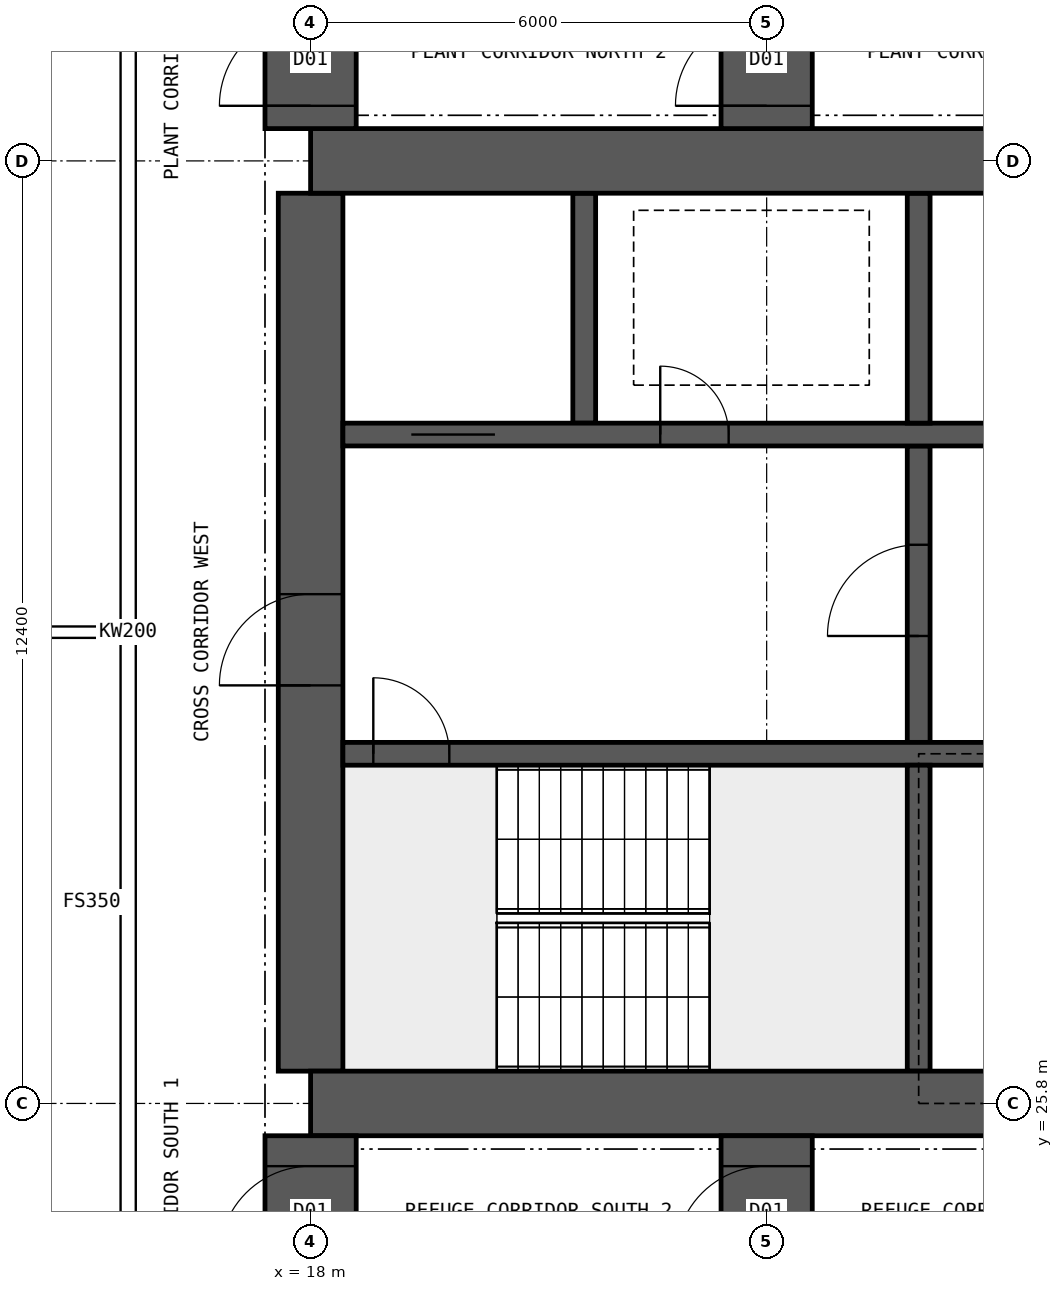
"""IFC4 building model, lengths in metres.
Left out: names, types, materials, properties, quantities, classifications, styles, units other than length and angle.
Written with IfcOpenShell. Run it as: python <this file> out.ifc"""

import sys

from ifc_helpers import new_model, si_unit, direction, frame, frame_2d, origin, place, context, subcontext, project, spatial, polyline, rectangle, outline, extrude, element, fill, save


model = new_model("IFC4")
c1 = context("Model", 3, precision=1e-05, world=origin(), true_north=direction((0.0, 1.0)))
c2 = subcontext(c1, "Body", "Model", "MODEL_VIEW")
j1 = project(units=[si_unit("LENGTHUNIT", "METRE"), si_unit("PLANEANGLEUNIT", "RADIAN")], contexts=[c1])
p1 = place(None, origin())
s1 = spatial("IfcSite", under=j1, at=p1, CompositionType="ELEMENT")
p2 = place(p1, origin())
s2 = spatial("IfcBuilding", under=s1, at=p2, CompositionType="ELEMENT")
p3 = place(p2, frame((0.0, 0.0, 201.1)))
s3 = spatial("IfcBuildingStorey", under=s2, at=p3, CompositionType="ELEMENT", Elevation=201.1)
for number, where, z_axis, x_axis in (
    (1, (18.0, 25.8, 0.0), (0.0, 0.0, 1.0), (1.0, 0.0, 0.0)),
    (2, (18.0, 38.2, 0.0), (0.0, 0.0, 1.0), (1.0, 0.0, 0.0)),
):
    element("IfcWall", number, at=place(p3, frame(where, z_axis=z_axis, x_axis=x_axis)), inside=s3, PredefinedType="SHEAR", context=c2, shape_type="SweptSolid", body=[
        extrude(rectangle(XDim=48.0, YDim=0.85, at=frame_2d((24.0, 0.0))), origin(), (0.0, 0.0, 1.0), 7.2),
    ])
p4 = place(p3, frame((18.0, 26.225, 0.0), z_axis=(0.0, 0.0, 1.0), x_axis=(0.0, 1.0, 0.0)))
e3 = element("IfcWall", 3, at=p4, inside=s3, PredefinedType="SHEAR", context=c2, shape_type="SweptSolid", body=[
    extrude(rectangle(XDim=11.55, YDim=0.85, at=frame_2d((5.775, 0.0))), origin(), (0.0, 0.0, 1.0), 7.2),
])
p5 = place(p4, frame((5.075, 0.0, 0.0)))
e4 = element("IfcOpeningElement", 4, at=p5, cuts=e3, PredefinedType="OPENING", context=c2, shape_type="SweptSolid", body=[
    extrude(rectangle(XDim=1.2, YDim=2.1, at=frame_2d((0.6, 1.05))), frame((0.0, 0.435, 0.0), z_axis=(0.0, -1.0, 0.0), x_axis=(1.0, 0.0, 0.0)), (0.0, 0.0, 1.0), 0.87),
])
p6 = place(p3, frame((18.425, 30.4, 0.0), z_axis=(0.0, 0.0, 1.0), x_axis=(1.0, 0.0, 0.0)))
e5 = element("IfcWall", 5, at=p6, inside=s3, PredefinedType="SHEAR", context=c2, shape_type="SweptSolid", body=[
    extrude(rectangle(XDim=47.15, YDim=0.3, at=frame_2d((23.575, 0.0))), origin(), (0.0, 0.0, 1.0), 7.2),
])
p7 = place(p6, frame((0.4, 0.0, 0.0)))
e6 = element("IfcOpeningElement", 6, at=p7, cuts=e5, PredefinedType="OPENING", context=c2, shape_type="SweptSolid", body=[
    extrude(rectangle(XDim=1.0, YDim=2.1, at=frame_2d((0.5, 1.05))), frame((0.0, 0.16, 0.0), z_axis=(0.0, -1.0, 0.0), x_axis=(1.0, 0.0, 0.0)), (0.0, 0.0, 1.0), 0.32),
])
p8 = place(p6, frame((45.75, 0.0, 0.0)))
e7 = element("IfcOpeningElement", 7, at=p8, cuts=e5, PredefinedType="OPENING", context=c2, shape_type="SweptSolid", body=[
    extrude(rectangle(XDim=1.0, YDim=2.1, at=frame_2d((0.5, 1.05))), frame((0.0, 0.16, 0.0), z_axis=(0.0, -1.0, 0.0), x_axis=(1.0, 0.0, 0.0)), (0.0, 0.0, 1.0), 0.32),
])
p9 = place(p6, frame((18.9, 0.0, 0.0)))
e8 = element("IfcOpeningElement", 8, at=p9, cuts=e5, PredefinedType="OPENING", context=c2, shape_type="SweptSolid", body=[
    extrude(rectangle(XDim=0.9, YDim=2.1, at=frame_2d((0.45, 1.05))), frame((0.0, 0.16, 0.0), z_axis=(0.0, -1.0, 0.0), x_axis=(1.0, 0.0, 0.0)), (0.0, 0.0, 1.0), 0.32),
])
p10 = place(p6, frame((30.192, 0.0, 0.0)))
e9 = element("IfcOpeningElement", 9, at=p10, cuts=e5, PredefinedType="OPENING", context=c2, shape_type="SweptSolid", body=[
    extrude(rectangle(XDim=1.1, YDim=2.1, at=frame_2d((0.55, 1.05))), frame((0.0, 0.16, 0.0), z_axis=(0.0, -1.0, 0.0), x_axis=(1.0, 0.0, 0.0)), (0.0, 0.0, 1.0), 0.32),
])
p11 = place(p6, frame((33.725, 0.0, 0.0)))
e10 = element("IfcOpeningElement", 10, at=p11, cuts=e5, PredefinedType="OPENING", context=c2, shape_type="SweptSolid", body=[
    extrude(rectangle(XDim=1.1, YDim=2.1, at=frame_2d((0.55, 1.05))), frame((0.0, 0.16, 0.0), z_axis=(0.0, -1.0, 0.0), x_axis=(1.0, 0.0, 0.0)), (0.0, 0.0, 1.0), 0.32),
])
p12 = place(p6, frame((37.258, 0.0, 0.0)))
e11 = element("IfcOpeningElement", 11, at=p12, cuts=e5, PredefinedType="OPENING", context=c2, shape_type="SweptSolid", body=[
    extrude(rectangle(XDim=1.1, YDim=2.1, at=frame_2d((0.55, 1.05))), frame((0.0, 0.16, 0.0), z_axis=(0.0, -1.0, 0.0), x_axis=(1.0, 0.0, 0.0)), (0.0, 0.0, 1.0), 0.32),
])
p13 = place(p3, frame((18.425, 34.6, 0.0), z_axis=(0.0, 0.0, 1.0), x_axis=(1.0, 0.0, 0.0)))
e12 = element("IfcWall", 12, at=p13, inside=s3, PredefinedType="SHEAR", context=c2, shape_type="SweptSolid", body=[
    extrude(rectangle(XDim=47.15, YDim=0.3, at=frame_2d((23.575, 0.0))), origin(), (0.0, 0.0, 1.0), 7.2),
])
p14 = place(p13, frame((0.9, 0.0, 0.0)))
e13 = element("IfcOpeningElement", 13, at=p14, cuts=e12, PredefinedType="OPENING", context=c2, shape_type="SweptSolid", body=[
    extrude(rectangle(XDim=1.1, YDim=2.1, at=frame_2d((0.55, 1.05))), frame((0.0, 0.16, 0.0), z_axis=(0.0, -1.0, 0.0), x_axis=(1.0, 0.0, 0.0)), (0.0, 0.0, 1.0), 0.32),
])
p15 = place(p13, frame((45.15, 0.0, 0.0)))
e14 = element("IfcOpeningElement", 14, at=p15, cuts=e12, PredefinedType="OPENING", context=c2, shape_type="SweptSolid", body=[
    extrude(rectangle(XDim=1.1, YDim=2.1, at=frame_2d((0.55, 1.05))), frame((0.0, 0.16, 0.0), z_axis=(0.0, -1.0, 0.0), x_axis=(1.0, 0.0, 0.0)), (0.0, 0.0, 1.0), 0.32),
])
p16 = place(p13, frame((4.175, 0.0, 0.0)))
e15 = element("IfcOpeningElement", 15, at=p16, cuts=e12, PredefinedType="OPENING", context=c2, shape_type="SweptSolid", body=[
    extrude(rectangle(XDim=0.9, YDim=2.1, at=frame_2d((0.45, 1.05))), frame((0.0, 0.16, 0.0), z_axis=(0.0, -1.0, 0.0), x_axis=(1.0, 0.0, 0.0)), (0.0, 0.0, 1.0), 0.32),
])
p17 = place(p13, frame((42.075, 0.0, 0.0)))
e16 = element("IfcOpeningElement", 16, at=p17, cuts=e12, PredefinedType="OPENING", context=c2, shape_type="SweptSolid", body=[
    extrude(rectangle(XDim=0.9, YDim=2.1, at=frame_2d((0.45, 1.05))), frame((0.0, 0.16, 0.0), z_axis=(0.0, -1.0, 0.0), x_axis=(1.0, 0.0, 0.0)), (0.0, 0.0, 1.0), 0.32),
])
p18 = place(p13, frame((8.95, 0.0, 0.0)))
e17 = element("IfcOpeningElement", 17, at=p18, cuts=e12, PredefinedType="OPENING", context=c2, shape_type="SweptSolid", body=[
    extrude(rectangle(XDim=0.9, YDim=2.1, at=frame_2d((0.45, 1.05))), frame((0.0, 0.16, 0.0), z_axis=(0.0, -1.0, 0.0), x_axis=(1.0, 0.0, 0.0)), (0.0, 0.0, 1.0), 0.32),
])
p19 = place(p13, frame((12.924, 0.0, 0.0)))
e18 = element("IfcOpeningElement", 18, at=p19, cuts=e12, PredefinedType="OPENING", context=c2, shape_type="SweptSolid", body=[
    extrude(rectangle(XDim=0.9, YDim=2.1, at=frame_2d((0.45, 1.05))), frame((0.0, 0.16, 0.0), z_axis=(0.0, -1.0, 0.0), x_axis=(1.0, 0.0, 0.0)), (0.0, 0.0, 1.0), 0.32),
])
p20 = place(p13, frame((16.571, 0.0, 0.0)))
e19 = element("IfcOpeningElement", 19, at=p20, cuts=e12, PredefinedType="OPENING", context=c2, shape_type="SweptSolid", body=[
    extrude(rectangle(XDim=0.9, YDim=2.1, at=frame_2d((0.45, 1.05))), frame((0.0, 0.16, 0.0), z_axis=(0.0, -1.0, 0.0), x_axis=(1.0, 0.0, 0.0)), (0.0, 0.0, 1.0), 0.32),
])
p21 = place(p13, frame((20.33, 0.0, 0.0)))
e20 = element("IfcOpeningElement", 20, at=p21, cuts=e12, PredefinedType="OPENING", context=c2, shape_type="SweptSolid", body=[
    extrude(rectangle(XDim=0.9, YDim=2.1, at=frame_2d((0.45, 1.05))), frame((0.0, 0.16, 0.0), z_axis=(0.0, -1.0, 0.0), x_axis=(1.0, 0.0, 0.0)), (0.0, 0.0, 1.0), 0.32),
])
p22 = place(p13, frame((24.736, 0.0, 0.0)))
e21 = element("IfcOpeningElement", 21, at=p22, cuts=e12, PredefinedType="OPENING", context=c2, shape_type="SweptSolid", body=[
    extrude(rectangle(XDim=0.9, YDim=2.1, at=frame_2d((0.45, 1.05))), frame((0.0, 0.16, 0.0), z_axis=(0.0, -1.0, 0.0), x_axis=(1.0, 0.0, 0.0)), (0.0, 0.0, 1.0), 0.32),
])
p23 = place(p13, frame((27.533, 0.0, 0.0)))
e22 = element("IfcOpeningElement", 22, at=p23, cuts=e12, PredefinedType="OPENING", context=c2, shape_type="SweptSolid", body=[
    extrude(rectangle(XDim=0.9, YDim=2.1, at=frame_2d((0.45, 1.05))), frame((0.0, 0.16, 0.0), z_axis=(0.0, -1.0, 0.0), x_axis=(1.0, 0.0, 0.0)), (0.0, 0.0, 1.0), 0.32),
])
p24 = place(p13, frame((29.906, 0.0, 0.0)))
e23 = element("IfcOpeningElement", 23, at=p24, cuts=e12, PredefinedType="OPENING", context=c2, shape_type="SweptSolid", body=[
    extrude(rectangle(XDim=0.9, YDim=2.1, at=frame_2d((0.45, 1.05))), frame((0.0, 0.16, 0.0), z_axis=(0.0, -1.0, 0.0), x_axis=(1.0, 0.0, 0.0)), (0.0, 0.0, 1.0), 0.32),
])
p25 = place(p13, frame((35.376, 0.0, 0.0)))
e24 = element("IfcOpeningElement", 24, at=p25, cuts=e12, PredefinedType="OPENING", context=c2, shape_type="SweptSolid", body=[
    extrude(rectangle(XDim=0.9, YDim=2.1, at=frame_2d((0.45, 1.05))), frame((0.0, 0.16, 0.0), z_axis=(0.0, -1.0, 0.0), x_axis=(1.0, 0.0, 0.0)), (0.0, 0.0, 1.0), 0.32),
])
p26 = place(p3, frame((26.0, 26.225, 0.0), z_axis=(0.0, 0.0, 1.0), x_axis=(0.0, 1.0, 0.0)))
e25 = element("IfcWall", 25, at=p26, inside=s3, PredefinedType="SHEAR", context=c2, shape_type="SweptSolid", body=[
    extrude(rectangle(XDim=4.025, YDim=0.3, at=frame_2d((2.012, 0.0))), origin(), (0.0, 0.0, 1.0), 7.2),
])
p27 = place(p3, frame((26.0, 30.55, 0.0), z_axis=(0.0, 0.0, 1.0), x_axis=(0.0, 1.0, 0.0)))
e26 = element("IfcWall", 26, at=p27, inside=s3, PredefinedType="SHEAR", context=c2, shape_type="SweptSolid", body=[
    extrude(rectangle(XDim=3.9, YDim=0.3, at=frame_2d((1.95, 0.0))), origin(), (0.0, 0.0, 1.0), 7.2),
])
p28 = place(p27, frame((1.4, 0.0, 0.0)))
e27 = element("IfcOpeningElement", 27, at=p28, cuts=e26, PredefinedType="OPENING", context=c2, shape_type="SweptSolid", body=[
    extrude(rectangle(XDim=1.2, YDim=2.1, at=frame_2d((0.6, 1.05))), frame((0.0, 0.16, 0.0), z_axis=(0.0, -1.0, 0.0), x_axis=(1.0, 0.0, 0.0)), (0.0, 0.0, 1.0), 0.32),
])
for number, where, z_axis, x_axis in (
    (28, (21.6, 34.75, 0.0), (0.0, 0.0, 1.0), (0.0, 1.0, 0.0)),
    (29, (26.0, 34.75, 0.0), (0.0, 0.0, 1.0), (0.0, 1.0, 0.0)),
):
    element("IfcWall", number, at=place(p3, frame(where, z_axis=z_axis, x_axis=x_axis)), inside=s3, PredefinedType="SHEAR", context=c2, shape_type="SweptSolid", body=[
        extrude(rectangle(XDim=3.025, YDim=0.3, at=frame_2d((1.512, 0.0))), origin(), (0.0, 0.0, 1.0), 7.2),
    ])
p29 = place(p3, frame((18.0, 10.0, 0.0), z_axis=(0.0, 0.0, 1.0), x_axis=(0.0, 1.0, 0.0)))
e30 = element("IfcWall", 30, at=p29, inside=s3, PredefinedType="SHEAR", context=c2, shape_type="SweptSolid", body=[
    extrude(rectangle(XDim=15.375, YDim=1.2, at=frame_2d((7.688, 0.0))), origin(), (0.0, 0.0, 1.0), 7.2),
])
p30 = place(p29, frame((13.775, 0.0, 0.0)))
e31 = element("IfcOpeningElement", 31, at=p30, cuts=e30, PredefinedType="OPENING", context=c2, shape_type="SweptSolid", body=[
    extrude(rectangle(XDim=1.2, YDim=2.1, at=frame_2d((0.6, 1.05))), frame((0.0, 0.61, 0.0), z_axis=(0.0, -1.0, 0.0), x_axis=(1.0, 0.0, 0.0)), (0.0, 0.0, 1.0), 1.22),
])
p31 = place(p29, frame((3.95, 0.0, 0.0)))
e32 = element("IfcOpeningElement", 32, at=p31, cuts=e30, PredefinedType="OPENING", context=c2, shape_type="SweptSolid", body=[
    extrude(rectangle(XDim=1.2, YDim=2.1, at=frame_2d((0.6, 1.05))), frame((0.0, 0.61, 0.0), z_axis=(0.0, -1.0, 0.0), x_axis=(1.0, 0.0, 0.0)), (0.0, 0.0, 1.0), 1.22),
])
p32 = place(p3, frame((18.0, 38.625, 0.0), z_axis=(0.0, 0.0, 1.0), x_axis=(0.0, 1.0, 0.0)))
e33 = element("IfcWall", 33, at=p32, inside=s3, PredefinedType="SHEAR", context=c2, shape_type="SweptSolid", body=[
    extrude(rectangle(XDim=15.375, YDim=1.2, at=frame_2d((7.688, 0.0))), origin(), (0.0, 0.0, 1.0), 7.2),
])
p33 = place(p32, frame((0.3, 0.0, 0.0)))
e34 = element("IfcOpeningElement", 34, at=p33, cuts=e33, PredefinedType="OPENING", context=c2, shape_type="SweptSolid", body=[
    extrude(rectangle(XDim=1.2, YDim=2.1, at=frame_2d((0.6, 1.05))), frame((0.0, 0.61, 0.0), z_axis=(0.0, -1.0, 0.0), x_axis=(1.0, 0.0, 0.0)), (0.0, 0.0, 1.0), 1.22),
])
p34 = place(p32, frame((10.225, 0.0, 0.0)))
e35 = element("IfcOpeningElement", 35, at=p34, cuts=e33, PredefinedType="OPENING", context=c2, shape_type="SweptSolid", body=[
    extrude(rectangle(XDim=1.2, YDim=2.1, at=frame_2d((0.6, 1.05))), frame((0.0, 0.61, 0.0), z_axis=(0.0, -1.0, 0.0), x_axis=(1.0, 0.0, 0.0)), (0.0, 0.0, 1.0), 1.22),
])
p35 = place(p3, frame((24.0, 10.0, 0.0), z_axis=(0.0, 0.0, 1.0), x_axis=(0.0, 1.0, 0.0)))
e36 = element("IfcWall", 36, at=p35, inside=s3, PredefinedType="SHEAR", context=c2, shape_type="SweptSolid", body=[
    extrude(rectangle(XDim=15.375, YDim=1.2, at=frame_2d((7.688, 0.0))), origin(), (0.0, 0.0, 1.0), 7.2),
])
p36 = place(p35, frame((13.775, 0.0, 0.0)))
e37 = element("IfcOpeningElement", 37, at=p36, cuts=e36, PredefinedType="OPENING", context=c2, shape_type="SweptSolid", body=[
    extrude(rectangle(XDim=1.2, YDim=2.1, at=frame_2d((0.6, 1.05))), frame((0.0, 0.61, 0.0), z_axis=(0.0, -1.0, 0.0), x_axis=(1.0, 0.0, 0.0)), (0.0, 0.0, 1.0), 1.22),
])
p37 = place(p3, frame((24.0, 38.625, 0.0), z_axis=(0.0, 0.0, 1.0), x_axis=(0.0, 1.0, 0.0)))
e38 = element("IfcWall", 38, at=p37, inside=s3, PredefinedType="SHEAR", context=c2, shape_type="SweptSolid", body=[
    extrude(rectangle(XDim=15.375, YDim=1.2, at=frame_2d((7.688, 0.0))), origin(), (0.0, 0.0, 1.0), 7.2),
])
p38 = place(p37, frame((0.3, 0.0, 0.0)))
e39 = element("IfcOpeningElement", 39, at=p38, cuts=e38, PredefinedType="OPENING", context=c2, shape_type="SweptSolid", body=[
    extrude(rectangle(XDim=1.2, YDim=2.1, at=frame_2d((0.6, 1.05))), frame((0.0, 0.61, 0.0), z_axis=(0.0, -1.0, 0.0), x_axis=(1.0, 0.0, 0.0)), (0.0, 0.0, 1.0), 1.22),
])
p39 = place(p3, frame((15.6, 23.475, 0.0), z_axis=(0.0, 0.0, 1.0), x_axis=(0.0, 1.0, 0.0)))
e40 = element("IfcWall", 40, at=p39, inside=s3, PredefinedType="SOLIDWALL", context=c2, shape_type="SweptSolid", body=[
    extrude(rectangle(XDim=17.05, YDim=0.2, at=frame_2d((8.525, 0.0))), origin(), (0.0, 0.0, 1.0), 6.9),
])
p40 = place(p3, frame((8.705, 32.0, 0.0), z_axis=(0.0, 0.0, 1.0), x_axis=(1.0, 0.0, 0.0)))
e41 = element("IfcWall", 41, at=p40, inside=s3, PredefinedType="PARTITIONING", context=c2, shape_type="SweptSolid", body=[
    extrude(outline(polyline([(0.0, 0.0), (6.795, 0.0), (6.795, 6.9), (3.597, 6.9), (3.595, 6.45), (2.997, 6.45), (2.995, 6.9), (0.0, 6.9), (0.0, 0.0)])), frame((0.0, 0.075, 0.0), z_axis=(0.0, -1.0, 0.0), x_axis=(1.0, 0.0, 0.0)), (0.0, 0.0, 1.0), 0.15),
])
p41 = place(p5, origin())
e42 = element("IfcDoor", 42, at=p41, inside=s3, OperationType="SINGLE_SWING_LEFT", PredefinedType="DOOR", context=c2, shape_type="SweptSolid", body=[
    extrude(rectangle(XDim=1.2, YDim=2.1, at=frame_2d((0.6, 1.05))), frame((0.0, 0.025, 0.0), z_axis=(0.0, -1.0, 0.0), x_axis=(1.0, 0.0, 0.0)), (0.0, 0.0, 1.0), 0.05),
])
fill(e4, e42)
p42 = place(p7, origin())
e43 = element("IfcDoor", 43, at=p42, inside=s3, OperationType="SINGLE_SWING_LEFT", PredefinedType="DOOR", context=c2, shape_type="SweptSolid", body=[
    extrude(rectangle(XDim=1.0, YDim=2.1, at=frame_2d((0.5, 1.05))), frame((0.0, 0.025, 0.0), z_axis=(0.0, -1.0, 0.0), x_axis=(1.0, 0.0, 0.0)), (0.0, 0.0, 1.0), 0.05),
])
fill(e6, e43)
p43 = place(p14, origin())
e44 = element("IfcDoor", 44, at=p43, inside=s3, OperationType="DOUBLE_DOOR_SLIDING", PredefinedType="DOOR", context=c2, shape_type="SweptSolid", body=[
    extrude(rectangle(XDim=1.1, YDim=2.1, at=frame_2d((0.55, 1.05))), frame((0.0, 0.025, 0.0), z_axis=(0.0, -1.0, 0.0), x_axis=(1.0, 0.0, 0.0)), (0.0, 0.0, 1.0), 0.05),
])
fill(e13, e44)
p44 = place(p16, origin())
e45 = element("IfcDoor", 45, at=p44, inside=s3, OperationType="SINGLE_SWING_LEFT", PredefinedType="DOOR", context=c2, shape_type="SweptSolid", body=[
    extrude(rectangle(XDim=0.9, YDim=2.1, at=frame_2d((0.45, 1.05))), frame((0.0, 0.025, 0.0), z_axis=(0.0, -1.0, 0.0), x_axis=(1.0, 0.0, 0.0)), (0.0, 0.0, 1.0), 0.05),
])
fill(e15, e45)
p45 = place(p28, origin())
e46 = element("IfcDoor", 46, at=p45, inside=s3, OperationType="SINGLE_SWING_LEFT", PredefinedType="DOOR", context=c2, shape_type="SweptSolid", body=[
    extrude(rectangle(XDim=1.2, YDim=2.1, at=frame_2d((0.6, 1.05))), frame((0.0, 0.025, 0.0), z_axis=(0.0, -1.0, 0.0), x_axis=(1.0, 0.0, 0.0)), (0.0, 0.0, 1.0), 0.05),
])
fill(e27, e46)
p46 = place(p30, origin())
e47 = element("IfcDoor", 47, at=p46, inside=s3, OperationType="SINGLE_SWING_LEFT", PredefinedType="DOOR", context=c2, shape_type="SweptSolid", body=[
    extrude(rectangle(XDim=1.2, YDim=2.1, at=frame_2d((0.6, 1.05))), frame((0.0, 0.025, 0.0), z_axis=(0.0, -1.0, 0.0), x_axis=(1.0, 0.0, 0.0)), (0.0, 0.0, 1.0), 0.05),
])
fill(e31, e47)
p47 = place(p36, origin())
e48 = element("IfcDoor", 48, at=p47, inside=s3, OperationType="SINGLE_SWING_LEFT", PredefinedType="DOOR", context=c2, shape_type="SweptSolid", body=[
    extrude(rectangle(XDim=1.2, YDim=2.1, at=frame_2d((0.6, 1.05))), frame((0.0, 0.025, 0.0), z_axis=(0.0, -1.0, 0.0), x_axis=(1.0, 0.0, 0.0)), (0.0, 0.0, 1.0), 0.05),
])
fill(e37, e48)
p48 = place(p33, origin())
e49 = element("IfcDoor", 49, at=p48, inside=s3, OperationType="SINGLE_SWING_LEFT", PredefinedType="DOOR", context=c2, shape_type="SweptSolid", body=[
    extrude(rectangle(XDim=1.2, YDim=2.1, at=frame_2d((0.6, 1.05))), frame((0.0, 0.025, 0.0), z_axis=(0.0, -1.0, 0.0), x_axis=(1.0, 0.0, 0.0)), (0.0, 0.0, 1.0), 0.05),
])
fill(e34, e49)
p49 = place(p38, origin())
e50 = element("IfcDoor", 50, at=p49, inside=s3, OperationType="SINGLE_SWING_LEFT", PredefinedType="DOOR", context=c2, shape_type="SweptSolid", body=[
    extrude(rectangle(XDim=1.2, YDim=2.1, at=frame_2d((0.6, 1.05))), frame((0.0, 0.025, 0.0), z_axis=(0.0, -1.0, 0.0), x_axis=(1.0, 0.0, 0.0)), (0.0, 0.0, 1.0), 0.05),
])
fill(e39, e50)
save(model, sys.argv[1])
